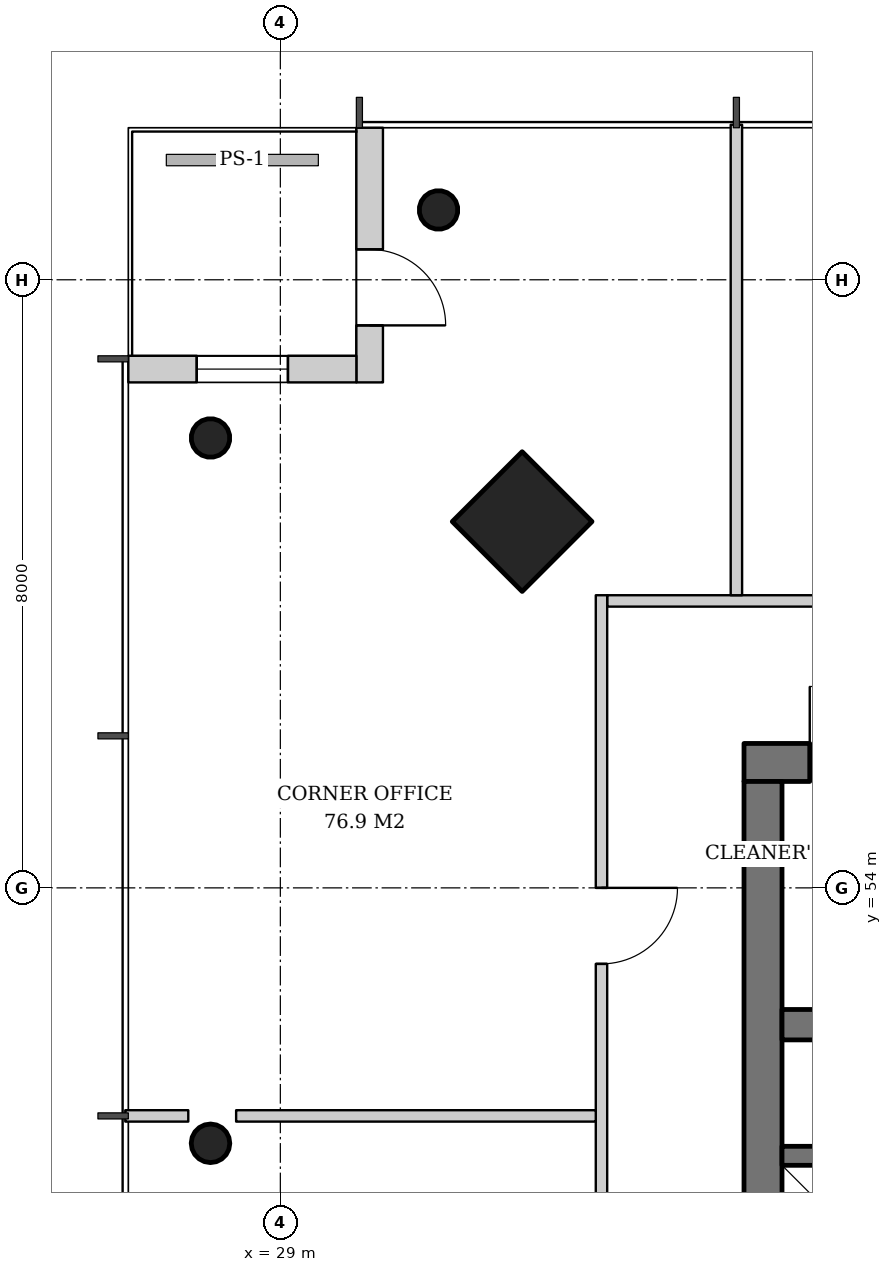
"""IFC4 building model, lengths in metres.
Left out: names, types, materials, properties, quantities, classifications, styles, units other than length and angle.
Written with IfcOpenShell. Run it as: python <this file> out.ifc"""

import sys

from ifc_helpers import new_model, si_unit, direction, frame, frame_2d, origin, origin_2d, place, context, subcontext, project, spatial, rectangle, hollow_circle, extrude, element, fill, save


model = new_model("IFC4")
c1 = context("Model", 3, precision=1e-05, world=origin(), true_north=direction((0.0, 1.0)))
c2 = subcontext(c1, "Body", "Model", "MODEL_VIEW")
j1 = project(units=[si_unit("LENGTHUNIT", "METRE"), si_unit("PLANEANGLEUNIT", "RADIAN")], contexts=[c1])
p1 = place(None, origin())
s1 = spatial("IfcSite", under=j1, at=p1, CompositionType="ELEMENT")
p2 = place(p1, origin())
s2 = spatial("IfcBuilding", under=s1, at=p2, CompositionType="ELEMENT")
p3 = place(p2, frame((0.0, 0.0, 241.4)))
s3 = spatial("IfcBuildingStorey", under=s2, at=p3, CompositionType="ELEMENT", Elevation=241.4)
p4 = place(p3, frame((32.143, 58.857, 0.0), z_axis=(0.031962158256, -0.031962158256, 0.998977898093), x_axis=(0.707106781187, 0.707106781187, 0.0)))
e1 = element("IfcColumn", 1, at=p4, inside=s3, PredefinedType="COLUMN", context=c2, shape_type="SweptSolid", body=[
    extrude(rectangle(XDim=1.3, YDim=1.3, at=origin_2d()), origin(), (0.0, 0.0, 1.0), 3.804),
])
for number, where, z_axis, x_axis in (
    (2, (31.043, 62.957, 0.0), (0.032, -0.032, 0.999), (0.707, 0.707, 0.0)),
    (3, (28.043, 59.957, 0.0), (0.032, -0.032, 0.999), (0.707, 0.707, 0.0)),
):
    element("IfcColumn", number, at=place(p3, frame(where, z_axis=z_axis, x_axis=x_axis)), inside=s3, PredefinedType="COLUMN", context=c2, shape_type="SweptSolid", body=[
        extrude(hollow_circle(Radius=0.254, WallThickness=0.02, at=origin_2d()), origin(), (0.0, 0.0, 1.0), 3.804),
    ])
p5 = place(p3, frame((28.043, 50.652, 0.0), z_axis=(0.031912535354, -0.010658915229, 0.999433828532), x_axis=(0.316800238982, 0.948492281772, 0.0)))
e4 = element("IfcColumn", 4, at=p5, inside=s3, PredefinedType="COLUMN", context=c2, shape_type="SweptSolid", body=[
    extrude(hollow_circle(Radius=0.254, WallThickness=0.02, at=origin_2d()), origin(), (0.0, 0.0, 1.0), 3.802),
])
p6 = place(p3, frame((35.1, 55.65, 0.0), z_axis=(0.0, 0.0, 1.0), x_axis=(1.0, 0.0, 0.0)))
e5 = element("IfcWall", 5, at=p6, inside=s3, PredefinedType="SHEAR", context=c2, shape_type="SweptSolid", body=[
    extrude(rectangle(XDim=19.8, YDim=0.5, at=frame_2d((9.9, 0.0))), origin(), (0.0, 0.0, 1.0), 3.8),
])
p7 = place(p6, frame((14.54, 0.0, 0.0)))
e6 = element("IfcOpeningElement", 6, at=p7, cuts=e5, PredefinedType="OPENING", context=c2, shape_type="SweptSolid", body=[
    extrude(rectangle(XDim=1.0, YDim=2.1, at=frame_2d((0.5, 1.05))), frame((0.0, 0.26, 0.0), z_axis=(0.0, -1.0, 0.0), x_axis=(1.0, 0.0, 0.0)), (0.0, 0.0, 1.0), 0.52),
])
p8 = place(p6, frame((0.865, 0.0, 0.0)))
e7 = element("IfcOpeningElement", 7, at=p8, cuts=e5, PredefinedType="OPENING", context=c2, shape_type="SweptSolid", body=[
    extrude(rectangle(XDim=1.0, YDim=2.1, at=frame_2d((0.5, 1.05))), frame((0.0, 0.26, 0.0), z_axis=(0.0, -1.0, 0.0), x_axis=(1.0, 0.0, 0.0)), (0.0, 0.0, 1.0), 0.52),
])
p9 = place(p6, frame((2.399, 0.0, 0.0)))
e8 = element("IfcOpeningElement", 8, at=p9, cuts=e5, PredefinedType="OPENING", context=c2, shape_type="SweptSolid", body=[
    extrude(rectangle(XDim=1.0, YDim=2.1, at=frame_2d((0.5, 1.05))), frame((0.0, 0.26, 0.0), z_axis=(0.0, -1.0, 0.0), x_axis=(1.0, 0.0, 0.0)), (0.0, 0.0, 1.0), 0.52),
])
p10 = place(p6, frame((3.966, 0.0, 0.0)))
e9 = element("IfcOpeningElement", 9, at=p10, cuts=e5, PredefinedType="OPENING", context=c2, shape_type="SweptSolid", body=[
    extrude(rectangle(XDim=1.0, YDim=2.1, at=frame_2d((0.5, 1.05))), frame((0.0, 0.26, 0.0), z_axis=(0.0, -1.0, 0.0), x_axis=(1.0, 0.0, 0.0)), (0.0, 0.0, 1.0), 0.52),
])
p11 = place(p3, frame((35.35, 36.6, 0.0), z_axis=(0.0, 0.0, 1.0), x_axis=(0.0, 1.0, 0.0)))
e10 = element("IfcWall", 10, at=p11, inside=s3, PredefinedType="SHEAR", context=c2, shape_type="SweptSolid", body=[
    extrude(rectangle(XDim=18.8, YDim=0.5, at=frame_2d((9.4, 0.0))), origin(), (0.0, 0.0, 1.0), 3.8),
])
p12 = place(p11, frame((8.5, 0.0, 0.0)))
e11 = element("IfcOpeningElement", 11, at=p12, cuts=e10, PredefinedType="OPENING", context=c2, shape_type="SweptSolid", body=[
    extrude(rectangle(XDim=1.8, YDim=2.4, at=frame_2d((0.9, 1.2))), frame((0.0, 0.26, 0.0), z_axis=(0.0, -1.0, 0.0), x_axis=(1.0, 0.0, 0.0)), (0.0, 0.0, 1.0), 0.52),
])
p13 = place(p3, frame((35.6, 52.2, 0.0), z_axis=(0.0, 0.0, 1.0), x_axis=(1.0, 0.0, 0.0)))
e12 = element("IfcWall", 12, at=p13, inside=s3, PredefinedType="SHEAR", context=c2, shape_type="SweptSolid", body=[
    extrude(rectangle(XDim=18.8, YDim=0.4, at=frame_2d((9.4, 0.0))), origin(), (0.0, 0.0, 1.0), 3.8),
])
p14 = place(p3, frame((30.175, 64.0, 0.0), z_axis=(0.0, 0.0, 1.0), x_axis=(0.0, -1.0, 0.0)))
e13 = element("IfcWall", 13, at=p14, inside=s3, PredefinedType="SOLIDWALL", context=c2, shape_type="SweptSolid", body=[
    extrude(rectangle(XDim=3.35, YDim=0.35, at=frame_2d((1.675, 0.0))), origin(), (0.0, 0.0, 1.0), 3.62),
])
p15 = place(p14, frame((1.6, 0.0, 0.0)))
e14 = element("IfcOpeningElement", 14, at=p15, cuts=e13, PredefinedType="OPENING", context=c2, shape_type="SweptSolid", body=[
    extrude(rectangle(XDim=1.0, YDim=2.4, at=frame_2d((0.5, 1.2))), frame((0.0, 0.185, 0.0), z_axis=(0.0, -1.0, 0.0), x_axis=(1.0, 0.0, 0.0)), (0.0, 0.0, 1.0), 0.37),
])
p16 = place(p3, frame((30.0, 60.825, 0.0), z_axis=(0.0, 0.0, 1.0), x_axis=(-1.0, 0.0, 0.0)))
e15 = element("IfcWall", 15, at=p16, inside=s3, PredefinedType="SOLIDWALL", context=c2, shape_type="SweptSolid", body=[
    extrude(rectangle(XDim=3.0, YDim=0.35, at=frame_2d((1.5, 0.0))), origin(), (0.0, 0.0, 1.0), 3.62),
])
p17 = place(p16, frame((0.9, 0.0, 0.6)))
e16 = element("IfcOpeningElement", 16, at=p17, cuts=e15, PredefinedType="OPENING", context=c2, shape_type="SweptSolid", body=[
    extrude(rectangle(XDim=1.2, YDim=2.55, at=frame_2d((0.6, 1.275))), frame((0.0, 0.185, 0.0), z_axis=(0.0, -1.0, 0.0), x_axis=(1.0, 0.0, 0.0)), (0.0, 0.0, 1.0), 0.37),
])
p18 = place(p3, frame((35.6, 50.475, 0.0), z_axis=(0.0, 0.0, 1.0), x_axis=(1.0, 0.0, 0.0)))
e17 = element("IfcWall", 17, at=p18, inside=s3, PredefinedType="SHEAR", context=c2, shape_type="SweptSolid", body=[
    extrude(rectangle(XDim=11.1, YDim=0.25, at=frame_2d((5.55, 0.0))), origin(), (0.0, 0.0, 1.0), 3.8),
])
p19 = place(p3, frame((56.85, 57.775, 0.0), z_axis=(0.0, 0.0, 1.0), x_axis=(-1.0, 0.0, 0.0)))
e18 = element("IfcWall", 18, at=p19, inside=s3, PredefinedType="PARTITIONING", context=c2, shape_type="SweptSolid", body=[
    extrude(rectangle(XDim=23.55, YDim=0.15, at=frame_2d((11.775, 0.0))), origin(), (0.0, 0.0, 1.0), 3.02),
])
p20 = place(p19, frame((3.85, 0.0, 0.0)))
e19 = element("IfcOpeningElement", 19, at=p20, cuts=e18, PredefinedType="OPENING", context=c2, shape_type="SweptSolid", body=[
    extrude(rectangle(XDim=1.0, YDim=2.1, at=frame_2d((0.5, 1.05))), frame((0.0, 0.085, 0.0), z_axis=(0.0, -1.0, 0.0), x_axis=(1.0, 0.0, 0.0)), (0.0, 0.0, 1.0), 0.17),
])
p21 = place(p19, frame((8.45, 0.0, 0.0)))
e20 = element("IfcOpeningElement", 20, at=p21, cuts=e18, PredefinedType="OPENING", context=c2, shape_type="SweptSolid", body=[
    extrude(rectangle(XDim=1.8, YDim=2.4, at=frame_2d((0.9, 1.2))), frame((0.0, 0.085, 0.0), z_axis=(0.0, -1.0, 0.0), x_axis=(1.0, 0.0, 0.0)), (0.0, 0.0, 1.0), 0.17),
])
p22 = place(p19, frame((18.85, 0.0, 0.0)))
e21 = element("IfcOpeningElement", 21, at=p22, cuts=e18, PredefinedType="OPENING", context=c2, shape_type="SweptSolid", body=[
    extrude(rectangle(XDim=1.0, YDim=2.1, at=frame_2d((0.5, 1.05))), frame((0.0, 0.085, 0.0), z_axis=(0.0, -1.0, 0.0), x_axis=(1.0, 0.0, 0.0)), (0.0, 0.0, 1.0), 0.17),
])
p23 = place(p3, frame((35.0, 57.85, 0.0), z_axis=(0.0, 0.0, 1.0), x_axis=(0.0, 1.0, 0.0)))
e22 = element("IfcWall", 22, at=p23, inside=s3, PredefinedType="PARTITIONING", context=c2, shape_type="SweptSolid", body=[
    extrude(rectangle(XDim=6.19, YDim=0.15, at=frame_2d((3.095, 0.0))), origin(), (0.0, 0.0, 1.0), 3.12),
])
p24 = place(p3, frame((33.225, 57.85, 0.0), z_axis=(0.0, 0.0, 1.0), x_axis=(0.0, -1.0, 0.0)))
e23 = element("IfcWall", 23, at=p24, inside=s3, PredefinedType="PARTITIONING", context=c2, shape_type="SweptSolid", body=[
    extrude(rectangle(XDim=23.55, YDim=0.15, at=frame_2d((11.775, 0.0))), origin(), (0.0, 0.0, 1.0), 3.02),
])
p25 = place(p24, frame((3.85, 0.0, 0.0)))
e24 = element("IfcOpeningElement", 24, at=p25, cuts=e23, PredefinedType="OPENING", context=c2, shape_type="SweptSolid", body=[
    extrude(rectangle(XDim=1.0, YDim=2.1, at=frame_2d((0.5, 1.05))), frame((0.0, 0.085, 0.0), z_axis=(0.0, -1.0, 0.0), x_axis=(1.0, 0.0, 0.0)), (0.0, 0.0, 1.0), 0.17),
])
p26 = place(p24, frame((8.95, 0.0, 0.0)))
e25 = element("IfcOpeningElement", 25, at=p26, cuts=e23, PredefinedType="OPENING", context=c2, shape_type="SweptSolid", body=[
    extrude(rectangle(XDim=0.8, YDim=2.1, at=frame_2d((0.4, 1.05))), frame((0.0, 0.085, 0.0), z_axis=(0.0, -1.0, 0.0), x_axis=(1.0, 0.0, 0.0)), (0.0, 0.0, 1.0), 0.17),
])
p27 = place(p24, frame((13.85, 0.0, 0.0)))
e26 = element("IfcOpeningElement", 26, at=p27, cuts=e23, PredefinedType="OPENING", context=c2, shape_type="SweptSolid", body=[
    extrude(rectangle(XDim=1.0, YDim=2.1, at=frame_2d((0.5, 1.05))), frame((0.0, 0.085, 0.0), z_axis=(0.0, -1.0, 0.0), x_axis=(1.0, 0.0, 0.0)), (0.0, 0.0, 1.0), 0.17),
])
p28 = place(p24, frame((18.95, 0.0, 0.0)))
e27 = element("IfcOpeningElement", 27, at=p28, cuts=e23, PredefinedType="OPENING", context=c2, shape_type="SweptSolid", body=[
    extrude(rectangle(XDim=0.8, YDim=2.1, at=frame_2d((0.4, 1.05))), frame((0.0, 0.085, 0.0), z_axis=(0.0, -1.0, 0.0), x_axis=(1.0, 0.0, 0.0)), (0.0, 0.0, 1.0), 0.17),
])
p29 = place(p3, frame((33.15, 51.0, 0.0), z_axis=(0.0, 0.0, 1.0), x_axis=(-1.0, 0.0, 0.0)))
e28 = element("IfcWall", 28, at=p29, inside=s3, PredefinedType="PARTITIONING", context=c2, shape_type="SweptSolid", body=[
    extrude(rectangle(XDim=4.732, YDim=0.15, at=frame_2d((2.366, 0.0))), origin(), (0.0, 0.0, 1.0), 3.62),
])
p30 = place(p3, frame((27.789, 51.0, 0.0), z_axis=(0.0, 0.0, 1.0), x_axis=(-1.0, 0.0, 0.0)))
e29 = element("IfcWall", 29, at=p30, inside=s3, PredefinedType="PARTITIONING", context=c2, shape_type="SweptSolid", body=[
    extrude(rectangle(XDim=0.829, YDim=0.15, at=frame_2d((0.415, 0.0))), origin(), (0.0, 0.0, 1.0), 3.62),
])
p31 = place(p15, origin())
e30 = element("IfcDoor", 30, at=p31, inside=s3, OperationType="SINGLE_SWING_RIGHT", PredefinedType="DOOR", context=c2, shape_type="SweptSolid", body=[
    extrude(rectangle(XDim=1.0, YDim=2.4, at=frame_2d((0.5, 1.2))), frame((0.0, 0.025, 0.0), z_axis=(0.0, -1.0, 0.0), x_axis=(1.0, 0.0, 0.0)), (0.0, 0.0, 1.0), 0.05),
])
fill(e14, e30)
p32 = place(p17, origin())
e31 = element("IfcWindow", 31, at=p32, inside=s3, PartitioningType="SINGLE_PANEL", PredefinedType="WINDOW", context=c2, shape_type="SweptSolid", body=[
    extrude(rectangle(XDim=1.2, YDim=2.55, at=frame_2d((0.6, 1.275))), frame((0.0, 0.03, 0.0), z_axis=(0.0, -1.0, 0.0), x_axis=(1.0, 0.0, 0.0)), (0.0, 0.0, 1.0), 0.06),
])
fill(e16, e31)
p33 = place(p8, origin())
e32 = element("IfcDoor", 32, at=p33, inside=s3, OperationType="SINGLE_SWING_LEFT", PredefinedType="DOOR", context=c2, shape_type="SweptSolid", body=[
    extrude(rectangle(XDim=1.0, YDim=2.1, at=frame_2d((0.5, 1.05))), frame((0.0, -0.19, 0.0), z_axis=(0.0, -1.0, 0.0), x_axis=(1.0, 0.0, 0.0)), (0.0, 0.0, 1.0), 0.05),
])
fill(e7, e32)
p34 = place(p25, origin())
e33 = element("IfcDoor", 33, at=p34, inside=s3, OperationType="SINGLE_SWING_LEFT", PredefinedType="DOOR", context=c2, shape_type="SweptSolid", body=[
    extrude(rectangle(XDim=1.0, YDim=2.1, at=frame_2d((0.5, 1.05))), frame((0.0, 0.025, 0.0), z_axis=(0.0, -1.0, 0.0), x_axis=(1.0, 0.0, 0.0)), (0.0, 0.0, 1.0), 0.05),
])
fill(e24, e33)
save(model, sys.argv[1])
